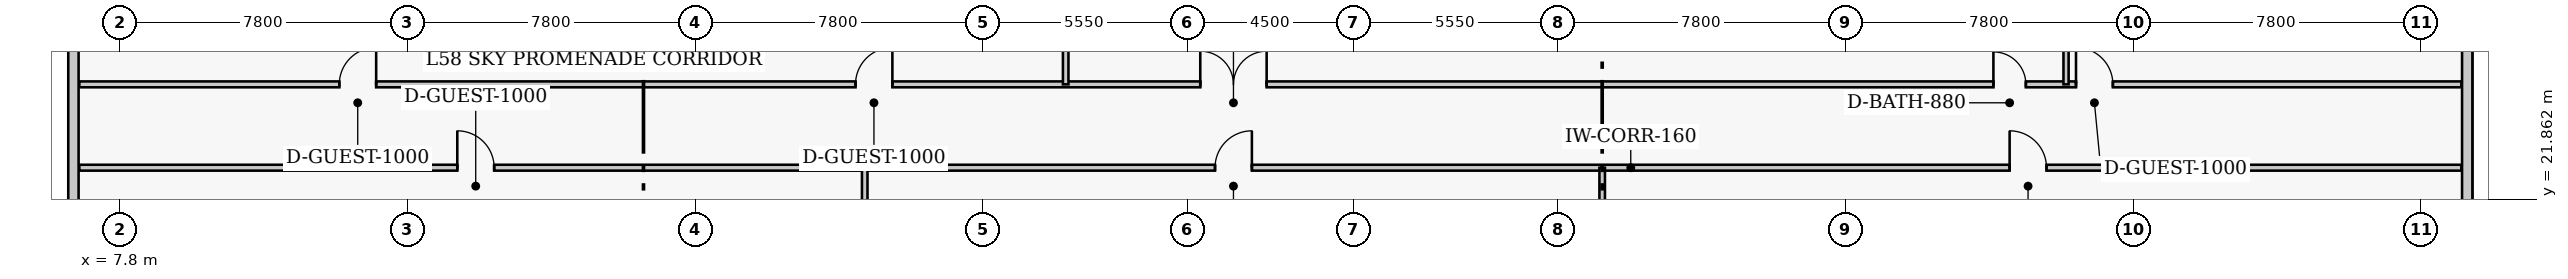
"""IFC4 building model, lengths in metres.
Left out: names, types, materials, properties, quantities, classifications, styles, units other than length and angle.
Written with IfcOpenShell. Run it as: python <this file> out.ifc"""

import sys

from ifc_helpers import new_model, si_unit, direction, frame, frame_2d, origin, place, context, subcontext, project, spatial, rectangle, extrude, element, fill, save


model = new_model("IFC4")
c1 = context("Model", 3, precision=1e-05, world=origin(), true_north=direction((0.0, 1.0)))
c2 = subcontext(c1, "Body", "Model", "MODEL_VIEW")
j1 = project(units=[si_unit("LENGTHUNIT", "METRE"), si_unit("PLANEANGLEUNIT", "RADIAN")], contexts=[c1])
p1 = place(None, origin())
s1 = spatial("IfcSite", under=j1, at=p1, CompositionType="ELEMENT")
p2 = place(p1, origin())
s2 = spatial("IfcBuilding", under=s1, at=p2, CompositionType="ELEMENT")
p3 = place(p2, frame((0.0, 0.0, 231.9)))
s3 = spatial("IfcBuildingStorey", under=s2, at=p3, CompositionType="ELEMENT", Elevation=231.9)
p4 = place(p3, frame((71.46, 13.96, 0.0), z_axis=(0.0, 0.0, 1.0), x_axis=(0.0, 1.0, 0.0)))
e1 = element("IfcWall", 1, at=p4, inside=s3, PredefinedType="SOLIDWALL", context=c2, shape_type="SweptSolid", body=[
    extrude(rectangle(XDim=29.88, YDim=0.28, at=frame_2d((14.94, 0.0))), origin(), (0.0, 0.0, 1.0), 4.35),
])
p5 = place(p4, frame((0.834, 0.0, 0.65)))
e2 = element("IfcOpeningElement", 2, at=p5, cuts=e1, PredefinedType="OPENING", context=c2, shape_type="SweptSolid", body=[
    extrude(rectangle(XDim=2.6, YDim=2.2, at=frame_2d((1.3, 1.1))), frame((0.0, 0.15, 0.0), z_axis=(0.0, -1.0, 0.0), x_axis=(1.0, 0.0, 0.0)), (0.0, 0.0, 1.0), 0.3),
])
p6 = place(p4, frame((17.909, 0.0, 0.65)))
e3 = element("IfcOpeningElement", 3, at=p6, cuts=e1, PredefinedType="OPENING", context=c2, shape_type="SweptSolid", body=[
    extrude(rectangle(XDim=2.6, YDim=2.2, at=frame_2d((1.3, 1.1))), frame((0.0, 0.15, 0.0), z_axis=(0.0, -1.0, 0.0), x_axis=(1.0, 0.0, 0.0)), (0.0, 0.0, 1.0), 0.3),
])
p7 = place(p4, frame((21.027, 0.0, 0.65)))
e4 = element("IfcOpeningElement", 4, at=p7, cuts=e1, PredefinedType="OPENING", context=c2, shape_type="SweptSolid", body=[
    extrude(rectangle(XDim=2.6, YDim=2.2, at=frame_2d((1.3, 1.1))), frame((0.0, 0.15, 0.0), z_axis=(0.0, -1.0, 0.0), x_axis=(1.0, 0.0, 0.0)), (0.0, 0.0, 1.0), 0.3),
])
p8 = place(p4, frame((26.446, 0.0, 0.65)))
e5 = element("IfcOpeningElement", 5, at=p8, cuts=e1, PredefinedType="OPENING", context=c2, shape_type="SweptSolid", body=[
    extrude(rectangle(XDim=2.6, YDim=2.2, at=frame_2d((1.3, 1.1))), frame((0.0, 0.15, 0.0), z_axis=(0.0, -1.0, 0.0), x_axis=(1.0, 0.0, 0.0)), (0.0, 0.0, 1.0), 0.3),
])
p9 = place(p3, frame((6.54, 39.44, 0.0), z_axis=(0.0, 0.0, 1.0), x_axis=(0.0, -1.0, 0.0)))
e6 = element("IfcWall", 6, at=p9, inside=s3, PredefinedType="SOLIDWALL", context=c2, shape_type="SweptSolid", body=[
    extrude(rectangle(XDim=29.88, YDim=0.28, at=frame_2d((14.94, 0.0))), origin(), (0.0, 0.0, 1.0), 4.35),
])
p10 = place(p9, frame((1.984, 0.0, 0.65)))
e7 = element("IfcOpeningElement", 7, at=p10, cuts=e6, PredefinedType="OPENING", context=c2, shape_type="SweptSolid", body=[
    extrude(rectangle(XDim=2.6, YDim=2.2, at=frame_2d((1.3, 1.1))), frame((0.0, 0.15, 0.0), z_axis=(0.0, -1.0, 0.0), x_axis=(1.0, 0.0, 0.0)), (0.0, 0.0, 1.0), 0.3),
])
p11 = place(p9, frame((5.103, 0.0, 0.65)))
e8 = element("IfcOpeningElement", 8, at=p11, cuts=e6, PredefinedType="OPENING", context=c2, shape_type="SweptSolid", body=[
    extrude(rectangle(XDim=2.6, YDim=2.2, at=frame_2d((1.3, 1.1))), frame((0.0, 0.15, 0.0), z_axis=(0.0, -1.0, 0.0), x_axis=(1.0, 0.0, 0.0)), (0.0, 0.0, 1.0), 0.3),
])
p12 = place(p9, frame((22.177, 0.0, 0.65)))
e9 = element("IfcOpeningElement", 9, at=p12, cuts=e6, PredefinedType="OPENING", context=c2, shape_type="SweptSolid", body=[
    extrude(rectangle(XDim=2.6, YDim=2.2, at=frame_2d((1.3, 1.1))), frame((0.0, 0.15, 0.0), z_axis=(0.0, -1.0, 0.0), x_axis=(1.0, 0.0, 0.0)), (0.0, 0.0, 1.0), 0.3),
])
p13 = place(p3, frame((6.7, 22.72, 0.0), z_axis=(0.0, 0.0, 1.0), x_axis=(1.0, 0.0, 0.0)))
e10 = element("IfcWall", 10, at=p13, inside=s3, PredefinedType="PARTITIONING", context=c2, shape_type="SweptSolid", body=[
    extrude(rectangle(XDim=64.6, YDim=0.16, at=frame_2d((32.3, 0.0))), origin(), (0.0, 0.0, 1.0), 4.35),
])
p14 = place(p13, frame((10.25, 0.0, 0.0)))
e11 = element("IfcOpeningElement", 11, at=p14, cuts=e10, PredefinedType="OPENING", context=c2, shape_type="SweptSolid", body=[
    extrude(rectangle(XDim=1.0, YDim=2.15, at=frame_2d((0.5, 1.075))), frame((0.0, 0.09, 0.0), z_axis=(0.0, -1.0, 0.0), x_axis=(1.0, 0.0, 0.0)), (0.0, 0.0, 1.0), 0.18),
])
p15 = place(p13, frame((30.8, 0.0, 0.0)))
e12 = element("IfcOpeningElement", 12, at=p15, cuts=e10, PredefinedType="OPENING", context=c2, shape_type="SweptSolid", body=[
    extrude(rectangle(XDim=1.0, YDim=2.15, at=frame_2d((0.5, 1.075))), frame((0.0, 0.09, 0.0), z_axis=(0.0, -1.0, 0.0), x_axis=(1.0, 0.0, 0.0)), (0.0, 0.0, 1.0), 0.18),
])
p16 = place(p13, frame((52.35, 0.0, 0.0)))
e13 = element("IfcOpeningElement", 13, at=p16, cuts=e10, PredefinedType="OPENING", context=c2, shape_type="SweptSolid", body=[
    extrude(rectangle(XDim=1.0, YDim=2.15, at=frame_2d((0.5, 1.075))), frame((0.0, 0.09, 0.0), z_axis=(0.0, -1.0, 0.0), x_axis=(1.0, 0.0, 0.0)), (0.0, 0.0, 1.0), 0.18),
])
p17 = place(p3, frame((6.7, 24.98, 0.0), z_axis=(0.0, 0.0, 1.0), x_axis=(1.0, 0.0, 0.0)))
e14 = element("IfcWall", 14, at=p17, inside=s3, PredefinedType="PARTITIONING", context=c2, shape_type="SweptSolid", body=[
    extrude(rectangle(XDim=64.6, YDim=0.16, at=frame_2d((32.3, 0.0))), origin(), (0.0, 0.0, 1.0), 4.35),
])
p18 = place(p17, frame((30.4, 0.0, 0.0)))
e15 = element("IfcOpeningElement", 15, at=p18, cuts=e14, PredefinedType="OPENING", context=c2, shape_type="SweptSolid", body=[
    extrude(rectangle(XDim=1.8, YDim=2.2, at=frame_2d((0.9, 1.1))), frame((0.0, 0.09, 0.0), z_axis=(0.0, -1.0, 0.0), x_axis=(1.0, 0.0, 0.0)), (0.0, 0.0, 1.0), 0.18),
])
p19 = place(p17, frame((21.05, 0.0, 0.0)))
e16 = element("IfcOpeningElement", 16, at=p19, cuts=e14, PredefinedType="OPENING", context=c2, shape_type="SweptSolid", body=[
    extrude(rectangle(XDim=1.0, YDim=2.15, at=frame_2d((0.5, 1.075))), frame((0.0, 0.09, 0.0), z_axis=(0.0, -1.0, 0.0), x_axis=(1.0, 0.0, 0.0)), (0.0, 0.0, 1.0), 0.18),
])
p20 = place(p17, frame((7.05, 0.0, 0.0)))
e17 = element("IfcOpeningElement", 17, at=p20, cuts=e14, PredefinedType="OPENING", context=c2, shape_type="SweptSolid", body=[
    extrude(rectangle(XDim=1.0, YDim=2.15, at=frame_2d((0.5, 1.075))), frame((0.0, 0.09, 0.0), z_axis=(0.0, -1.0, 0.0), x_axis=(1.0, 0.0, 0.0)), (0.0, 0.0, 1.0), 0.18),
])
p21 = place(p17, frame((51.91, 0.0, 0.0)))
e18 = element("IfcOpeningElement", 18, at=p21, cuts=e14, PredefinedType="OPENING", context=c2, shape_type="SweptSolid", body=[
    extrude(rectangle(XDim=0.88, YDim=2.05, at=frame_2d((0.44, 1.025))), frame((0.0, 0.09, 0.0), z_axis=(0.0, -1.0, 0.0), x_axis=(1.0, 0.0, 0.0)), (0.0, 0.0, 1.0), 0.18),
])
p22 = place(p17, frame((54.15, 0.0, 0.0)))
e19 = element("IfcOpeningElement", 19, at=p22, cuts=e14, PredefinedType="OPENING", context=c2, shape_type="SweptSolid", body=[
    extrude(rectangle(XDim=1.0, YDim=2.15, at=frame_2d((0.5, 1.075))), frame((0.0, 0.09, 0.0), z_axis=(0.0, -1.0, 0.0), x_axis=(1.0, 0.0, 0.0)), (0.0, 0.0, 1.0), 0.18),
])
p23 = place(p3, frame((33.45, 24.98, 0.0), z_axis=(0.0, 0.0, 1.0), x_axis=(0.0, 1.0, 0.0)))
e20 = element("IfcWall", 20, at=p23, inside=s3, PredefinedType="PARTITIONING", context=c2, shape_type="SweptSolid", body=[
    extrude(rectangle(XDim=4.57, YDim=0.15, at=frame_2d((2.285, 0.0))), origin(), (0.0, 0.0, 1.0), 4.35),
])
p24 = place(p3, frame((28.0, 8.4, 0.0), z_axis=(0.0, 0.0, 1.0), x_axis=(0.0, 1.0, 0.0)))
e21 = element("IfcWall", 21, at=p24, inside=s3, PredefinedType="PARTITIONING", context=c2, shape_type="SweptSolid", body=[
    extrude(rectangle(XDim=14.32, YDim=0.15, at=frame_2d((7.16, 0.0))), origin(), (0.0, 0.0, 1.0), 3.946),
])
p25 = place(p3, frame((48.0, 9.92, 0.0), z_axis=(0.0, 0.0, 1.0), x_axis=(0.0, 1.0, 0.0)))
e22 = element("IfcWall", 22, at=p25, inside=s3, PredefinedType="PARTITIONING", context=c2, shape_type="SweptSolid", body=[
    extrude(rectangle(XDim=12.8, YDim=0.15, at=frame_2d((6.4, 0.0))), origin(), (0.0, 0.0, 1.0), 4.35),
])
p26 = place(p3, frame((60.58, 24.98, 0.0), z_axis=(0.0, 0.0, 1.0), x_axis=(0.0, 1.0, 0.0)))
e23 = element("IfcWall", 23, at=p26, inside=s3, PredefinedType="PLUMBINGWALL", context=c2, shape_type="SweptSolid", body=[
    extrude(rectangle(XDim=7.32, YDim=0.14, at=frame_2d((3.66, 0.0))), origin(), (0.0, 0.0, 1.0), 4.35),
])
p27 = place(p18, origin())
e24 = element("IfcDoor", 24, at=p27, inside=s3, OperationType="DOUBLE_DOOR_SINGLE_SWING", PredefinedType="DOOR", context=c2, shape_type="SweptSolid", body=[
    extrude(rectangle(XDim=1.8, YDim=2.2, at=frame_2d((0.9, 1.1))), frame((0.0, 0.025, 0.0), z_axis=(0.0, -1.0, 0.0), x_axis=(1.0, 0.0, 0.0)), (0.0, 0.0, 1.0), 0.05),
])
fill(e15, e24)
p28 = place(p19, origin())
e25 = element("IfcDoor", 25, at=p28, inside=s3, OperationType="SINGLE_SWING_RIGHT", PredefinedType="DOOR", context=c2, shape_type="SweptSolid", body=[
    extrude(rectangle(XDim=1.0, YDim=2.15, at=frame_2d((0.5, 1.075))), frame((0.0, 0.025, 0.0), z_axis=(0.0, -1.0, 0.0), x_axis=(1.0, 0.0, 0.0)), (0.0, 0.0, 1.0), 0.05),
])
fill(e16, e25)
p29 = place(p14, origin())
e26 = element("IfcDoor", 26, at=p29, inside=s3, OperationType="SINGLE_SWING_LEFT", PredefinedType="DOOR", context=c2, shape_type="SweptSolid", body=[
    extrude(rectangle(XDim=1.0, YDim=2.15, at=frame_2d((0.5, 1.075))), frame((0.0, 0.025, 0.0), z_axis=(0.0, -1.0, 0.0), x_axis=(1.0, 0.0, 0.0)), (0.0, 0.0, 1.0), 0.05),
])
fill(e11, e26)
p30 = place(p15, origin())
e27 = element("IfcDoor", 27, at=p30, inside=s3, OperationType="SINGLE_SWING_RIGHT", PredefinedType="DOOR", context=c2, shape_type="SweptSolid", body=[
    extrude(rectangle(XDim=1.0, YDim=2.15, at=frame_2d((0.5, 1.075))), frame((0.0, 0.025, 0.0), z_axis=(0.0, -1.0, 0.0), x_axis=(1.0, 0.0, 0.0)), (0.0, 0.0, 1.0), 0.05),
])
fill(e12, e27)
p31 = place(p16, origin())
e28 = element("IfcDoor", 28, at=p31, inside=s3, OperationType="SINGLE_SWING_LEFT", PredefinedType="DOOR", context=c2, shape_type="SweptSolid", body=[
    extrude(rectangle(XDim=1.0, YDim=2.15, at=frame_2d((0.5, 1.075))), frame((0.0, 0.025, 0.0), z_axis=(0.0, -1.0, 0.0), x_axis=(1.0, 0.0, 0.0)), (0.0, 0.0, 1.0), 0.05),
])
fill(e13, e28)
p32 = place(p20, origin())
e29 = element("IfcDoor", 29, at=p32, inside=s3, OperationType="SINGLE_SWING_RIGHT", PredefinedType="DOOR", context=c2, shape_type="SweptSolid", body=[
    extrude(rectangle(XDim=1.0, YDim=2.15, at=frame_2d((0.5, 1.075))), frame((0.0, 0.025, 0.0), z_axis=(0.0, -1.0, 0.0), x_axis=(1.0, 0.0, 0.0)), (0.0, 0.0, 1.0), 0.05),
])
fill(e17, e29)
p33 = place(p21, origin())
e30 = element("IfcDoor", 30, at=p33, inside=s3, OperationType="SINGLE_SWING_LEFT", PredefinedType="DOOR", context=c2, shape_type="SweptSolid", body=[
    extrude(rectangle(XDim=0.88, YDim=2.05, at=frame_2d((0.44, 1.025))), frame((0.0, 0.025, 0.0), z_axis=(0.0, -1.0, 0.0), x_axis=(1.0, 0.0, 0.0)), (0.0, 0.0, 1.0), 0.05),
])
fill(e18, e30)
p34 = place(p22, origin())
e31 = element("IfcDoor", 31, at=p34, inside=s3, OperationType="SINGLE_SWING_LEFT", PredefinedType="DOOR", context=c2, shape_type="SweptSolid", body=[
    extrude(rectangle(XDim=1.0, YDim=2.15, at=frame_2d((0.5, 1.075))), frame((0.0, 0.025, 0.0), z_axis=(0.0, -1.0, 0.0), x_axis=(1.0, 0.0, 0.0)), (0.0, 0.0, 1.0), 0.05),
])
fill(e19, e31)
save(model, sys.argv[1])
